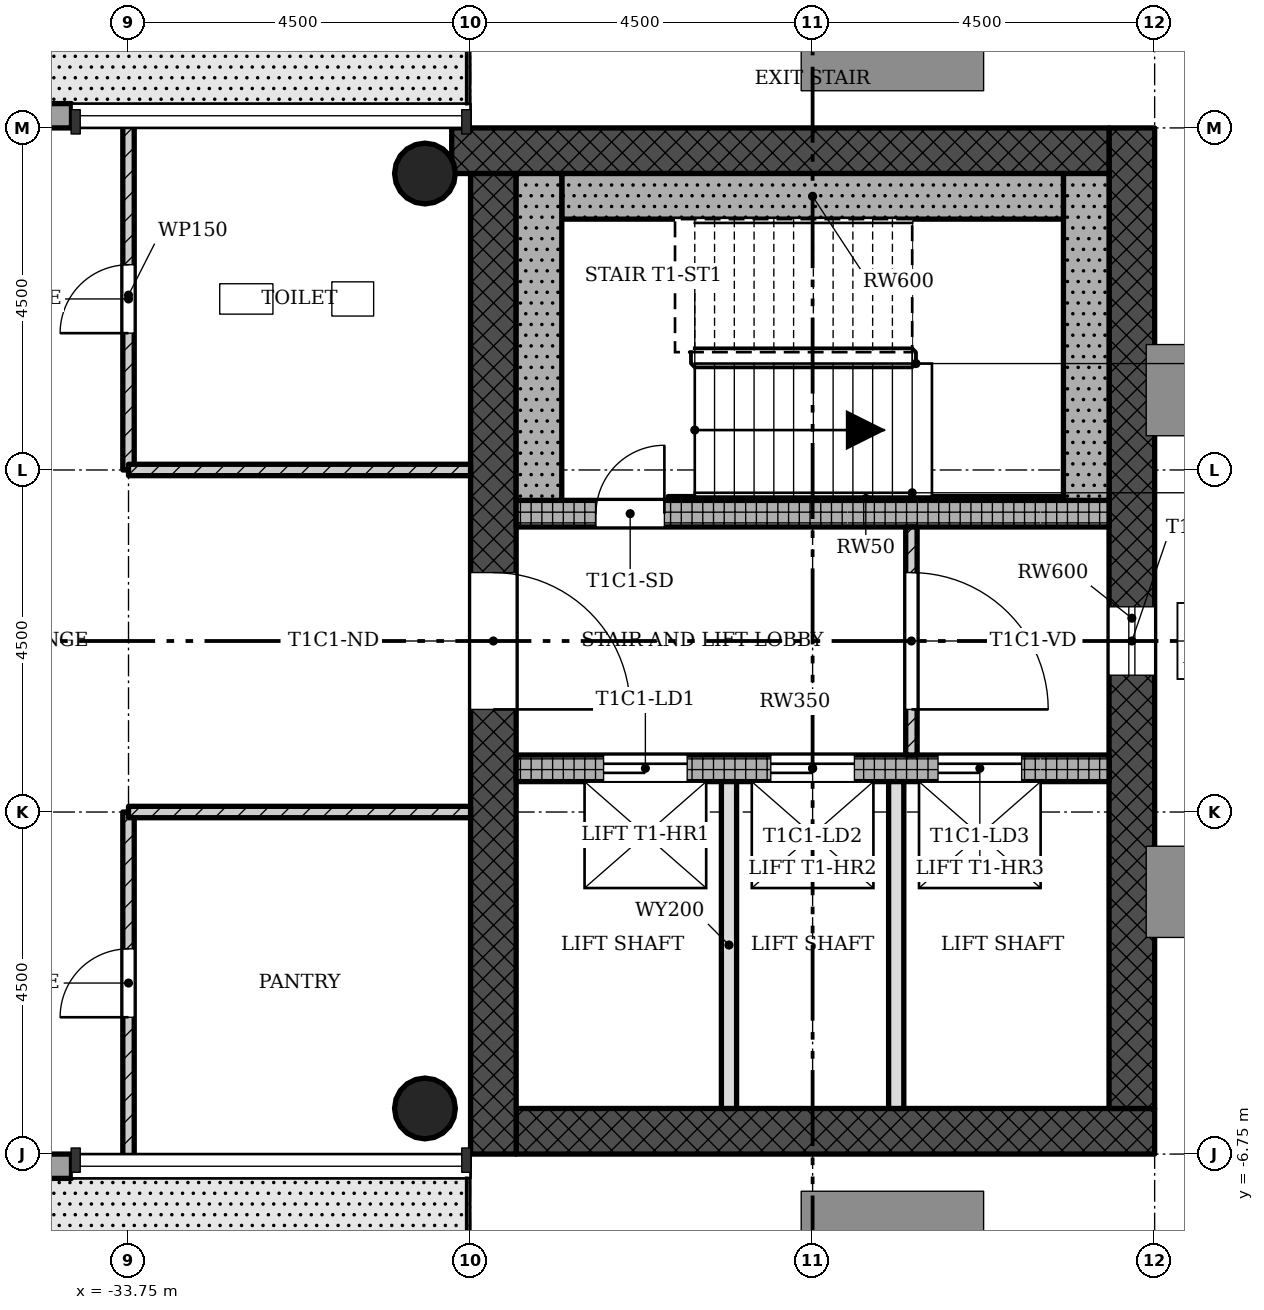
"""IFC4 building model, lengths in metres.
Left out: names, types, materials, properties, quantities, classifications, styles, units other than length and angle.
Written with IfcOpenShell. Run it as: python <this file> out.ifc"""

import sys

from ifc_helpers import new_model, si_unit, direction, frame, frame_2d, origin, origin_2d, place, context, subcontext, project, spatial, rectangle, hollow_circle, extrude, element, fill, save


model = new_model("IFC4")
c1 = context("Model", 3, precision=1e-05, world=origin(), true_north=direction((0.0, 1.0)))
c2 = subcontext(c1, "Body", "Model", "MODEL_VIEW")
j1 = project(units=[si_unit("LENGTHUNIT", "METRE"), si_unit("PLANEANGLEUNIT", "RADIAN")], contexts=[c1])
p1 = place(None, origin())
s1 = spatial("IfcSite", under=j1, at=p1, CompositionType="ELEMENT")
p2 = place(p1, origin())
s2 = spatial("IfcBuilding", under=s1, at=p2, CompositionType="ELEMENT")
p3 = place(p2, frame((0.0, 0.0, 246.9)))
s3 = spatial("IfcBuildingStorey", under=s2, at=p3, CompositionType="ELEMENT", Elevation=246.9)
p4 = place(p3, frame((-28.65, -6.45, 0.0), z_axis=(0.0, 0.0, 1.0), x_axis=(1.0, 0.0, 0.0)))
e1 = element("IfcWall", 1, at=p4, inside=s3, PredefinedType="SHEAR", context=c2, shape_type="SweptSolid", body=[
    extrude(rectangle(XDim=8.4, YDim=0.6, at=frame_2d((4.2, 0.0))), origin(), (0.0, 0.0, 1.0), 4.5),
])
p5 = place(p3, frame((-20.55, -6.15, 0.0), z_axis=(0.0, 0.0, 1.0), x_axis=(0.0, 1.0, 0.0)))
e2 = element("IfcWall", 2, at=p5, inside=s3, PredefinedType="SHEAR", context=c2, shape_type="SweptSolid", body=[
    extrude(rectangle(XDim=12.9, YDim=0.6, at=frame_2d((6.45, 0.0))), origin(), (0.0, 0.0, 1.0), 4.5),
])
p6 = place(p5, frame((5.7, 0.0, 0.45)))
e3 = element("IfcOpeningElement", 3, at=p6, cuts=e2, PredefinedType="OPENING", context=c2, shape_type="SweptSolid", body=[
    extrude(rectangle(XDim=0.9, YDim=2.4, at=frame_2d((0.45, 1.2))), frame((0.0, 0.31, 0.0), z_axis=(0.0, -1.0, 0.0), x_axis=(1.0, 0.0, 0.0)), (0.0, 0.0, 1.0), 0.62),
])
p7 = place(p3, frame((-20.85, 6.45, 0.0), z_axis=(0.0, 0.0, 1.0), x_axis=(-1.0, 0.0, 0.0)))
e4 = element("IfcWall", 4, at=p7, inside=s3, PredefinedType="SHEAR", context=c2, shape_type="SweptSolid", body=[
    extrude(rectangle(XDim=8.648, YDim=0.6, at=frame_2d((4.324, 0.0))), origin(), (0.0, 0.0, 1.0), 4.5),
])
p8 = place(p3, frame((-28.95, 6.15, 0.0), z_axis=(0.0, 0.0, 1.0), x_axis=(0.0, -1.0, 0.0)))
e5 = element("IfcWall", 5, at=p8, inside=s3, PredefinedType="SHEAR", context=c2, shape_type="SweptSolid", body=[
    extrude(rectangle(XDim=12.9, YDim=0.6, at=frame_2d((6.45, 0.0))), origin(), (0.0, 0.0, 1.0), 4.5),
])
p9 = place(p8, frame((5.25, 0.0, 0.0)))
e6 = element("IfcOpeningElement", 6, at=p9, cuts=e5, PredefinedType="OPENING", context=c2, shape_type="SweptSolid", body=[
    extrude(rectangle(XDim=1.8, YDim=2.1, at=frame_2d((0.9, 1.05))), frame((0.0, 0.31, 0.0), z_axis=(0.0, -1.0, 0.0), x_axis=(1.0, 0.0, 0.0)), (0.0, 0.0, 1.0), 0.62),
])
p10 = place(p3, frame((-28.65, -1.675, 0.0), z_axis=(0.0, 0.0, 1.0), x_axis=(1.0, 0.0, 0.0)))
e7 = element("IfcWall", 7, at=p10, inside=s3, PredefinedType="SHEAR", context=c2, shape_type="SweptSolid", body=[
    extrude(rectangle(XDim=7.8, YDim=0.35, at=frame_2d((3.9, 0.0))), origin(), (0.0, 0.0, 1.0), 4.5),
])
p11 = place(p10, frame((1.15, 0.0, 0.0)))
e8 = element("IfcOpeningElement", 8, at=p11, cuts=e7, PredefinedType="OPENING", context=c2, shape_type="SweptSolid", body=[
    extrude(rectangle(XDim=1.1, YDim=2.1, at=frame_2d((0.55, 1.05))), frame((0.0, 0.185, 0.0), z_axis=(0.0, -1.0, 0.0), x_axis=(1.0, 0.0, 0.0)), (0.0, 0.0, 1.0), 0.37),
])
p12 = place(p10, frame((3.35, 0.0, 0.0)))
e9 = element("IfcOpeningElement", 9, at=p12, cuts=e7, PredefinedType="OPENING", context=c2, shape_type="SweptSolid", body=[
    extrude(rectangle(XDim=1.1, YDim=2.1, at=frame_2d((0.55, 1.05))), frame((0.0, 0.185, 0.0), z_axis=(0.0, -1.0, 0.0), x_axis=(1.0, 0.0, 0.0)), (0.0, 0.0, 1.0), 0.37),
])
p13 = place(p10, frame((5.55, 0.0, 0.0)))
e10 = element("IfcOpeningElement", 10, at=p13, cuts=e7, PredefinedType="OPENING", context=c2, shape_type="SweptSolid", body=[
    extrude(rectangle(XDim=1.1, YDim=2.1, at=frame_2d((0.55, 1.05))), frame((0.0, 0.185, 0.0), z_axis=(0.0, -1.0, 0.0), x_axis=(1.0, 0.0, 0.0)), (0.0, 0.0, 1.0), 0.37),
])
p14 = place(p3, frame((-28.65, 1.675, 0.0), z_axis=(0.0, 0.0, 1.0), x_axis=(1.0, 0.0, 0.0)))
e11 = element("IfcWall", 11, at=p14, inside=s3, PredefinedType="SHEAR", context=c2, shape_type="SweptSolid", body=[
    extrude(rectangle(XDim=7.8, YDim=0.35, at=frame_2d((3.9, 0.0))), origin(), (0.0, 0.0, 1.0), 4.5),
])
p15 = place(p14, frame((1.05, 0.0, 0.0)))
e12 = element("IfcOpeningElement", 12, at=p15, cuts=e11, PredefinedType="OPENING", context=c2, shape_type="SweptSolid", body=[
    extrude(rectangle(XDim=0.9, YDim=2.1, at=frame_2d((0.45, 1.05))), frame((0.0, 0.185, 0.0), z_axis=(0.0, -1.0, 0.0), x_axis=(1.0, 0.0, 0.0)), (0.0, 0.0, 1.0), 0.37),
])
for number, where, z_axis, x_axis in (
    (13, (-29.85, -6.15, 0.0), (0.0, 0.0, 1.0), (1.0, 0.0, 0.0)),
    (14, (-29.85, 6.15, 0.0), (0.0, 0.0, 1.0), (1.0, 0.0, 0.0)),
):
    element("IfcColumn", number, at=place(p3, frame(where, z_axis=z_axis, x_axis=x_axis)), inside=s3, PredefinedType="COLUMN", context=c2, shape_type="SweptSolid", body=[
        extrude(hollow_circle(Radius=0.4, WallThickness=0.028, at=origin_2d()), origin(), (0.0, 0.0, 1.0), 4.5),
    ])
p16 = place(p3, frame((-37.5, -6.91, -0.02), z_axis=(0.0, 0.0, 1.0), x_axis=(1.0, 0.0, 0.0)))
e15 = element("IfcWall", 15, at=p16, inside=s3, PredefinedType="STANDARD", context=c2, shape_type="SweptSolid", body=[
    extrude(rectangle(XDim=3.0, YDim=0.32, at=frame_2d((1.5, 0.0))), origin(), (0.0, 0.0, 1.0), 4.22),
])
p17 = place(p16, frame((1.0, 0.0, 0.02)))
e16 = element("IfcOpeningElement", 16, at=p17, cuts=e15, PredefinedType="OPENING", context=c2, shape_type="SweptSolid", body=[
    extrude(rectangle(XDim=1.0, YDim=2.1, at=frame_2d((0.5, 1.05))), frame((0.0, 0.17, 0.0), z_axis=(0.0, -1.0, 0.0), x_axis=(1.0, 0.0, 0.0)), (0.0, 0.0, 1.0), 0.34),
])
p18 = place(p3, frame((-34.5, 6.91, -0.02), z_axis=(0.0, 0.0, 1.0), x_axis=(-1.0, 0.0, 0.0)))
e17 = element("IfcWall", 17, at=p18, inside=s3, PredefinedType="STANDARD", context=c2, shape_type="SweptSolid", body=[
    extrude(rectangle(XDim=3.0, YDim=0.32, at=frame_2d((1.5, 0.0))), origin(), (0.0, 0.0, 1.0), 4.22),
])
p19 = place(p18, frame((1.0, 0.0, 0.02)))
e18 = element("IfcOpeningElement", 18, at=p19, cuts=e17, PredefinedType="OPENING", context=c2, shape_type="SweptSolid", body=[
    extrude(rectangle(XDim=1.0, YDim=2.1, at=frame_2d((0.5, 1.05))), frame((0.0, 0.17, 0.0), z_axis=(0.0, -1.0, 0.0), x_axis=(1.0, 0.0, 0.0)), (0.0, 0.0, 1.0), 0.34),
])
p20 = place(p3, frame((-23.45, -1.5, 0.0), z_axis=(0.0, 0.0, 1.0), x_axis=(0.0, 1.0, 0.0)))
e19 = element("IfcWall", 19, at=p20, inside=s3, PredefinedType="PARTITIONING", context=c2, shape_type="SweptSolid", body=[
    extrude(rectangle(XDim=3.0, YDim=0.15, at=frame_2d((1.5, 0.0))), origin(), (0.0, 0.0, 1.0), 4.1),
])
p21 = place(p20, frame((0.6, 0.0, 0.0)))
e20 = element("IfcOpeningElement", 20, at=p21, cuts=e19, PredefinedType="OPENING", context=c2, shape_type="SweptSolid", body=[
    extrude(rectangle(XDim=1.8, YDim=2.1, at=frame_2d((0.9, 1.05))), frame((0.0, 0.085, 0.0), z_axis=(0.0, -1.0, 0.0), x_axis=(1.0, 0.0, 0.0)), (0.0, 0.0, 1.0), 0.17),
])
for number, where, z_axis, x_axis in (
    (21, (-25.85, -6.15, 0.0), (0.0, 0.0, 1.0), (0.0, 1.0, 0.0)),
    (22, (-23.65, -6.15, 0.0), (0.0, 0.0, 1.0), (0.0, 1.0, 0.0)),
):
    element("IfcWall", number, at=place(p3, frame(where, z_axis=z_axis, x_axis=x_axis)), inside=s3, PredefinedType="SOLIDWALL", context=c2, shape_type="SweptSolid", body=[
        extrude(rectangle(XDim=4.3, YDim=0.2, at=frame_2d((2.15, 0.0))), origin(), (0.0, 0.0, 1.0), 4.1),
    ])
p22 = place(p3, frame((-33.75, 2.25, 0.0), z_axis=(0.0, 0.0, 1.0), x_axis=(0.0, 1.0, 0.0)))
e23 = element("IfcWall", 23, at=p22, inside=s3, PredefinedType="PARTITIONING", context=c2, shape_type="SweptSolid", body=[
    extrude(rectangle(XDim=4.6, YDim=0.15, at=frame_2d((2.3, 0.0))), origin(), (0.0, 0.0, 1.0), 4.1),
])
p23 = place(p22, frame((1.8, 0.0, 0.0)))
e24 = element("IfcOpeningElement", 24, at=p23, cuts=e23, PredefinedType="OPENING", context=c2, shape_type="SweptSolid", body=[
    extrude(rectangle(XDim=0.9, YDim=2.1, at=frame_2d((0.45, 1.05))), frame((0.0, 0.085, 0.0), z_axis=(0.0, -1.0, 0.0), x_axis=(1.0, 0.0, 0.0)), (0.0, 0.0, 1.0), 0.17),
])
p24 = place(p3, frame((-33.75, 2.25, 0.0), z_axis=(0.0, 0.0, 1.0), x_axis=(1.0, 0.0, 0.0)))
e25 = element("IfcWall", 25, at=p24, inside=s3, PredefinedType="PARTITIONING", context=c2, shape_type="SweptSolid", body=[
    extrude(rectangle(XDim=4.5, YDim=0.15, at=frame_2d((2.25, 0.0))), origin(), (0.0, 0.0, 1.0), 4.1),
])
p25 = place(p3, frame((-33.75, -6.85, 0.0), z_axis=(0.0, 0.0, 1.0), x_axis=(0.0, 1.0, 0.0)))
e26 = element("IfcWall", 26, at=p25, inside=s3, PredefinedType="PARTITIONING", context=c2, shape_type="SweptSolid", body=[
    extrude(rectangle(XDim=4.6, YDim=0.15, at=frame_2d((2.3, 0.0))), origin(), (0.0, 0.0, 1.0), 4.1),
])
p26 = place(p25, frame((1.9, 0.0, 0.0)))
e27 = element("IfcOpeningElement", 27, at=p26, cuts=e26, PredefinedType="OPENING", context=c2, shape_type="SweptSolid", body=[
    extrude(rectangle(XDim=0.9, YDim=2.1, at=frame_2d((0.45, 1.05))), frame((0.0, 0.085, 0.0), z_axis=(0.0, -1.0, 0.0), x_axis=(1.0, 0.0, 0.0)), (0.0, 0.0, 1.0), 0.17),
])
p27 = place(p3, frame((-33.75, -2.25, 0.0), z_axis=(0.0, 0.0, 1.0), x_axis=(1.0, 0.0, 0.0)))
e28 = element("IfcWall", 28, at=p27, inside=s3, PredefinedType="PARTITIONING", context=c2, shape_type="SweptSolid", body=[
    extrude(rectangle(XDim=4.5, YDim=0.15, at=frame_2d((2.25, 0.0))), origin(), (0.0, 0.0, 1.0), 4.1),
])
p28 = place(p3, frame((-21.15, 1.85, 0.0), z_axis=(0.0, 0.0, 1.0), x_axis=(0.0, 1.0, 0.0)))
e29 = element("IfcWall", 29, at=p28, inside=s3, PredefinedType="SHEAR", context=c2, shape_type="SweptSolid", body=[
    extrude(rectangle(XDim=4.3, YDim=0.6, at=frame_2d((2.15, 0.0))), origin(), (0.0, 0.0, 1.0), 4.5),
])
p29 = place(p3, frame((-28.05, 5.85, 0.0), z_axis=(0.0, 0.0, 1.0), x_axis=(1.0, 0.0, 0.0)))
e30 = element("IfcWall", 30, at=p29, inside=s3, PredefinedType="SHEAR", context=c2, shape_type="SweptSolid", body=[
    extrude(rectangle(XDim=6.6, YDim=0.6, at=frame_2d((3.3, 0.0))), origin(), (0.0, 0.0, 1.0), 4.5),
])
p30 = place(p3, frame((-28.35, 1.85, 0.0), z_axis=(0.0, 0.0, 1.0), x_axis=(0.0, 1.0, 0.0)))
e31 = element("IfcWall", 31, at=p30, inside=s3, PredefinedType="SHEAR", context=c2, shape_type="SweptSolid", body=[
    extrude(rectangle(XDim=4.3, YDim=0.6, at=frame_2d((2.15, 0.0))), origin(), (0.0, 0.0, 1.0), 4.5),
])
p31 = place(p3, frame((-26.65, 1.875, 0.0), z_axis=(0.0, 0.0, 1.0), x_axis=(1.0, 0.0, 0.0)))
e32 = element("IfcWall", 32, at=p31, inside=s3, PredefinedType="SHEAR", context=c2, shape_type="SweptSolid", body=[
    extrude(rectangle(XDim=5.2, YDim=0.05, at=frame_2d((2.6, 0.0))), origin(), (0.0, 0.0, 1.0), 4.5),
])
p32 = place(p6, origin())
e33 = element("IfcWindow", 33, at=p32, inside=s3, PartitioningType="SINGLE_PANEL", PredefinedType="WINDOW", context=c2, shape_type="SweptSolid", body=[
    extrude(rectangle(XDim=0.9, YDim=2.4, at=frame_2d((0.45, 1.2))), frame((0.0, 0.03, 0.0), z_axis=(0.0, -1.0, 0.0), x_axis=(1.0, 0.0, 0.0)), (0.0, 0.0, 1.0), 0.06),
])
fill(e3, e33)
p33 = place(p21, origin())
e34 = element("IfcDoor", 34, at=p33, inside=s3, OperationType="SINGLE_SWING_LEFT", PredefinedType="DOOR", context=c2, shape_type="SweptSolid", body=[
    extrude(rectangle(XDim=1.8, YDim=2.1, at=frame_2d((0.9, 1.05))), frame((0.0, 0.025, 0.0), z_axis=(0.0, -1.0, 0.0), x_axis=(1.0, 0.0, 0.0)), (0.0, 0.0, 1.0), 0.05),
])
fill(e20, e34)
p34 = place(p23, origin())
e35 = element("IfcDoor", 35, at=p34, inside=s3, OperationType="SINGLE_SWING_RIGHT", PredefinedType="DOOR", context=c2, shape_type="SweptSolid", body=[
    extrude(rectangle(XDim=0.9, YDim=2.1, at=frame_2d((0.45, 1.05))), frame((0.0, 0.025, 0.0), z_axis=(0.0, -1.0, 0.0), x_axis=(1.0, 0.0, 0.0)), (0.0, 0.0, 1.0), 0.05),
])
fill(e24, e35)
p35 = place(p26, origin())
e36 = element("IfcDoor", 36, at=p35, inside=s3, OperationType="SINGLE_SWING_RIGHT", PredefinedType="DOOR", context=c2, shape_type="SweptSolid", body=[
    extrude(rectangle(XDim=0.9, YDim=2.1, at=frame_2d((0.45, 1.05))), frame((0.0, 0.025, 0.0), z_axis=(0.0, -1.0, 0.0), x_axis=(1.0, 0.0, 0.0)), (0.0, 0.0, 1.0), 0.05),
])
fill(e27, e36)
p36 = place(p15, origin())
e37 = element("IfcDoor", 37, at=p36, inside=s3, OperationType="SINGLE_SWING_LEFT", PredefinedType="DOOR", context=c2, shape_type="SweptSolid", body=[
    extrude(rectangle(XDim=0.9, YDim=2.1, at=frame_2d((0.45, 1.05))), frame((0.0, 0.025, 0.0), z_axis=(0.0, -1.0, 0.0), x_axis=(1.0, 0.0, 0.0)), (0.0, 0.0, 1.0), 0.05),
])
fill(e12, e37)
p37 = place(p11, origin())
e38 = element("IfcDoor", 38, at=p37, inside=s3, OperationType="SLIDING_TO_LEFT", PredefinedType="DOOR", context=c2, shape_type="SweptSolid", body=[
    extrude(rectangle(XDim=1.1, YDim=2.1, at=frame_2d((0.55, 1.05))), frame((0.0, 0.025, 0.0), z_axis=(0.0, -1.0, 0.0), x_axis=(1.0, 0.0, 0.0)), (0.0, 0.0, 1.0), 0.05),
])
fill(e8, e38)
p38 = place(p12, origin())
e39 = element("IfcDoor", 39, at=p38, inside=s3, OperationType="SLIDING_TO_LEFT", PredefinedType="DOOR", context=c2, shape_type="SweptSolid", body=[
    extrude(rectangle(XDim=1.1, YDim=2.1, at=frame_2d((0.55, 1.05))), frame((0.0, 0.025, 0.0), z_axis=(0.0, -1.0, 0.0), x_axis=(1.0, 0.0, 0.0)), (0.0, 0.0, 1.0), 0.05),
])
fill(e9, e39)
p39 = place(p13, origin())
e40 = element("IfcDoor", 40, at=p39, inside=s3, OperationType="SLIDING_TO_LEFT", PredefinedType="DOOR", context=c2, shape_type="SweptSolid", body=[
    extrude(rectangle(XDim=1.1, YDim=2.1, at=frame_2d((0.55, 1.05))), frame((0.0, 0.025, 0.0), z_axis=(0.0, -1.0, 0.0), x_axis=(1.0, 0.0, 0.0)), (0.0, 0.0, 1.0), 0.05),
])
fill(e10, e40)
p40 = place(p9, origin())
e41 = element("IfcDoor", 41, at=p40, inside=s3, OperationType="SINGLE_SWING_LEFT", PredefinedType="DOOR", context=c2, shape_type="SweptSolid", body=[
    extrude(rectangle(XDim=1.8, YDim=2.1, at=frame_2d((0.9, 1.05))), frame((0.0, 0.025, 0.0), z_axis=(0.0, -1.0, 0.0), x_axis=(1.0, 0.0, 0.0)), (0.0, 0.0, 1.0), 0.05),
])
fill(e6, e41)
save(model, sys.argv[1])
